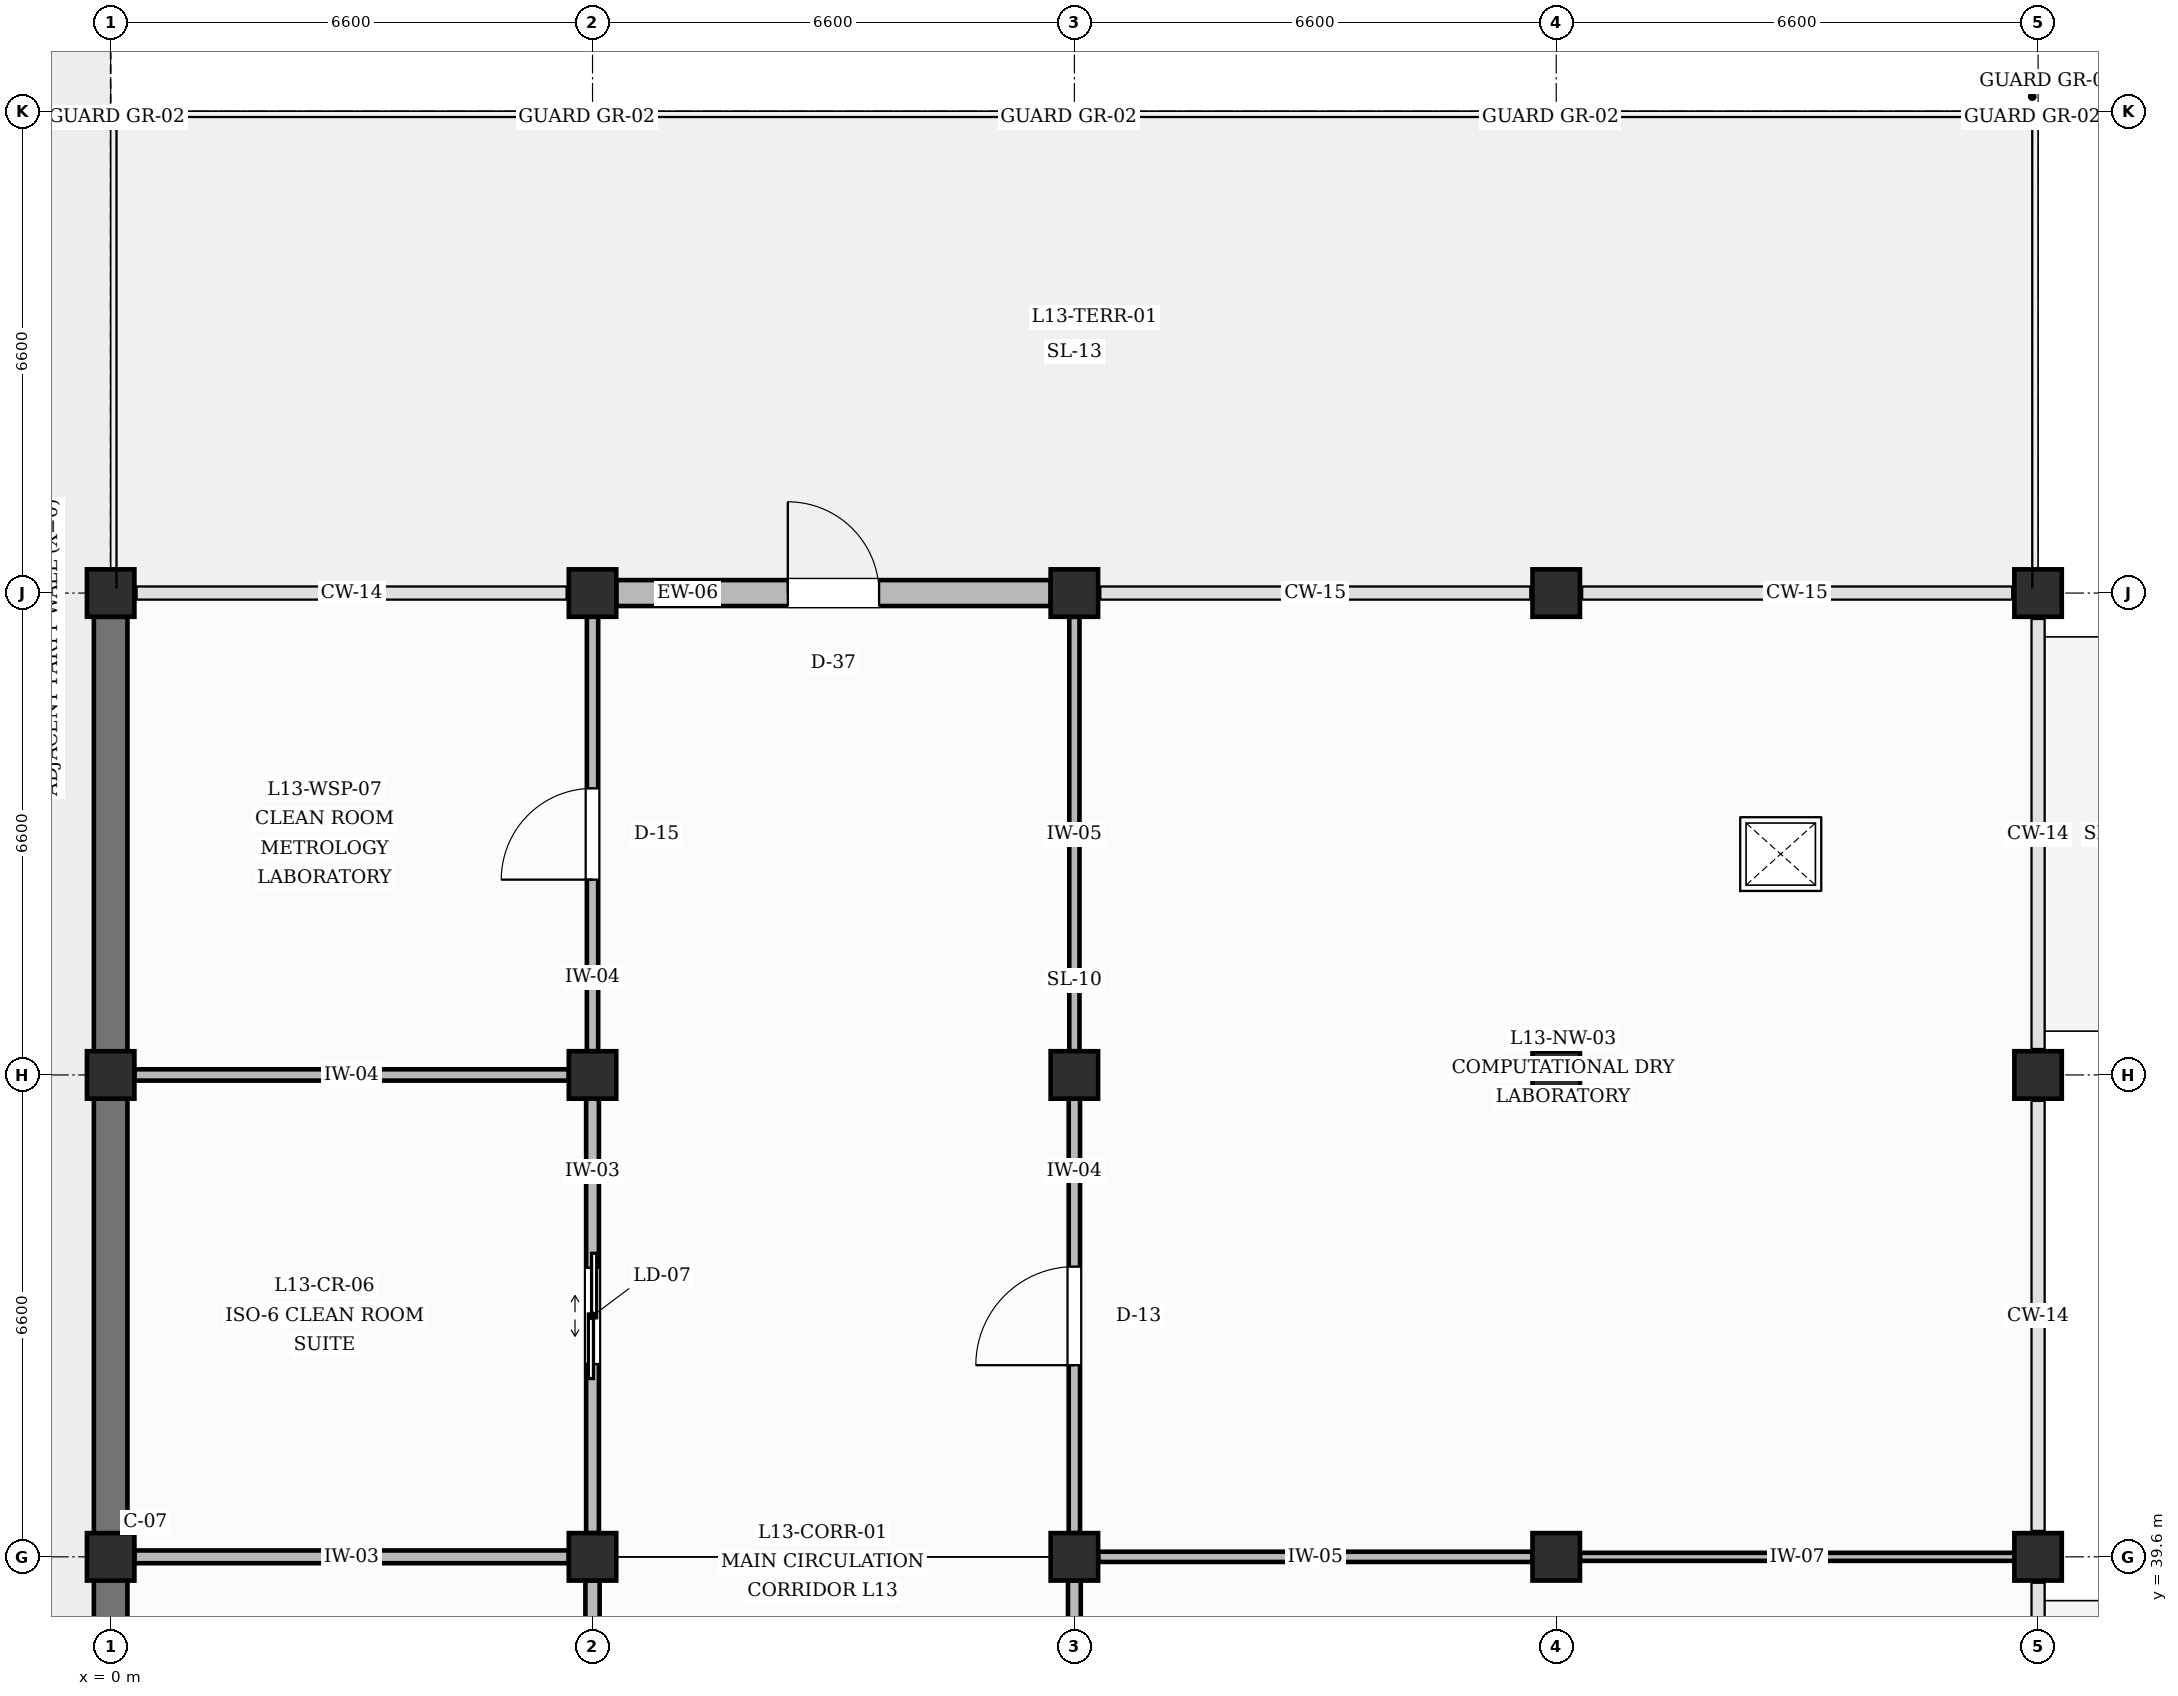
"""IFC4 building model, lengths in metres.
Left out: names, types, materials, properties, quantities, classifications, styles, units other than length and angle.
Written with IfcOpenShell. Run it as: python <this file> out.ifc"""

import sys

from ifc_helpers import new_model, si_unit, direction, frame, frame_2d, origin, origin_2d, place, context, subcontext, project, spatial, rectangle, extrude, element, fill, save


model = new_model("IFC4")
c1 = context("Model", 3, precision=1e-05, world=origin(), true_north=direction((0.0, 1.0)))
c2 = subcontext(c1, "Body", "Model", "MODEL_VIEW")
j1 = project(units=[si_unit("LENGTHUNIT", "METRE"), si_unit("PLANEANGLEUNIT", "RADIAN")], contexts=[c1])
p1 = place(None, origin())
s1 = spatial("IfcSite", under=j1, at=p1, CompositionType="ELEMENT")
p2 = place(p1, origin())
s2 = spatial("IfcBuilding", under=s1, at=p2, CompositionType="ELEMENT")
p3 = place(p2, frame((0.0, 0.0, 56.4)))
s3 = spatial("IfcBuildingStorey", under=s2, at=p3, CompositionType="ELEMENT", Elevation=56.4)
for number, where, z_axis, x_axis in (
    (1, (0.0, 39.6, 0.0), (0.0, 0.0, 1.0), (1.0, 0.0, 0.0)),
    (2, (0.0, 46.2, 0.0), (0.0, 0.0, 1.0), (1.0, 0.0, 0.0)),
    (3, (0.0, 52.8, 0.0), (0.0, 0.0, 1.0), (1.0, 0.0, 0.0)),
    (4, (6.6, 39.6, 0.0), (0.0, 0.0, 1.0), (1.0, 0.0, 0.0)),
    (5, (6.6, 46.2, 0.0), (0.0, 0.0, 1.0), (1.0, 0.0, 0.0)),
    (6, (6.6, 52.8, 0.0), (0.0, 0.0, 1.0), (1.0, 0.0, 0.0)),
    (7, (13.2, 39.6, 0.0), (0.0, 0.0, 1.0), (1.0, 0.0, 0.0)),
    (8, (13.2, 46.2, 0.0), (0.0, 0.0, 1.0), (1.0, 0.0, 0.0)),
    (9, (13.2, 52.8, 0.0), (0.0, 0.0, 1.0), (1.0, 0.0, 0.0)),
    (10, (19.8, 39.6, 0.0), (0.0, 0.0, 1.0), (1.0, 0.0, 0.0)),
    (11, (19.8, 46.2, 0.0), (0.0, 0.0, 1.0), (1.0, 0.0, 0.0)),
    (12, (19.8, 52.8, 0.0), (0.0, 0.0, 1.0), (1.0, 0.0, 0.0)),
    (13, (26.4, 39.6, 0.0), (0.0, 0.0, 1.0), (1.0, 0.0, 0.0)),
    (14, (26.4, 46.2, 0.0), (0.0, 0.0, 1.0), (1.0, 0.0, 0.0)),
    (15, (26.4, 52.8, 0.0), (0.0, 0.0, 1.0), (1.0, 0.0, 0.0)),
):
    element("IfcColumn", number, at=place(p3, frame(where, z_axis=z_axis, x_axis=x_axis)), inside=s3, PredefinedType="COLUMN", context=c2, shape_type="SweptSolid", body=[
        extrude(rectangle(XDim=0.65, YDim=0.65, at=origin_2d()), origin(), (0.0, 0.0, 1.0), 4.2),
    ])
for number, where, z_axis, x_axis in (
    (16, (0.0, 33.325, 0.0), (0.0, 0.0, 1.0), (0.0, 1.0, 0.0)),
    (17, (0.0, 39.925, 0.0), (0.0, 0.0, 1.0), (0.0, 1.0, 0.0)),
):
    element("IfcWall", number, at=place(p3, frame(where, z_axis=z_axis, x_axis=x_axis)), inside=s3, PredefinedType="SOLIDWALL", context=c2, shape_type="SweptSolid", body=[
        extrude(rectangle(XDim=5.95, YDim=0.46, at=frame_2d((2.975, 0.0))), origin(), (0.0, 0.0, 1.0), 3.3),
    ])
p4 = place(p3, frame((0.0, 46.525, 0.0), z_axis=(0.0, 0.0, 1.0), x_axis=(0.0, 1.0, 0.0)))
e18 = element("IfcWall", 18, at=p4, inside=s3, PredefinedType="SOLIDWALL", context=c2, shape_type="SweptSolid", body=[
    extrude(rectangle(XDim=5.95, YDim=0.46, at=frame_2d((2.975, 0.0))), origin(), (0.0, 0.0, 1.0), 3.3),
])
p5 = place(p3, frame((6.925, 52.8, 0.0), z_axis=(0.0, 0.0, 1.0), x_axis=(1.0, 0.0, 0.0)))
e19 = element("IfcWall", 19, at=p5, inside=s3, PredefinedType="SOLIDWALL", context=c2, shape_type="SweptSolid", body=[
    extrude(rectangle(XDim=5.95, YDim=0.355, at=frame_2d((2.975, 0.0))), origin(), (0.0, 0.0, 1.0), 3.3),
])
p6 = place(p5, frame((2.35, 0.0, 0.0)))
e20 = element("IfcOpeningElement", 20, at=p6, cuts=e19, PredefinedType="OPENING", context=c2, shape_type="SweptSolid", body=[
    extrude(rectangle(XDim=1.25, YDim=2.2, at=frame_2d((0.625, 1.1))), frame((0.0, 0.188, 0.0), z_axis=(0.0, -1.0, 0.0), x_axis=(1.0, 0.0, 0.0)), (0.0, 0.0, 1.0), 0.375),
])
p7 = place(p3, frame((6.6, 33.325, 0.0), z_axis=(0.0, 0.0, 1.0), x_axis=(0.0, 1.0, 0.0)))
e21 = element("IfcWall", 21, at=p7, inside=s3, PredefinedType="PARTITIONING", context=c2, shape_type="SweptSolid", body=[
    extrude(rectangle(XDim=5.95, YDim=0.195, at=frame_2d((2.975, 0.0))), origin(), (0.0, 0.0, 1.0), 3.3),
])
p8 = place(p7, frame((2.235, 0.0, 0.0)))
e22 = element("IfcOpeningElement", 22, at=p8, cuts=e21, PredefinedType="OPENING", context=c2, shape_type="SweptSolid", body=[
    extrude(rectangle(XDim=1.48, YDim=2.25, at=frame_2d((0.74, 1.125))), frame((0.0, 0.107, 0.0), z_axis=(0.0, -1.0, 0.0), x_axis=(1.0, 0.0, 0.0)), (0.0, 0.0, 1.0), 0.215),
])
p9 = place(p3, frame((0.325, 39.6, 0.0), z_axis=(0.0, 0.0, 1.0), x_axis=(1.0, 0.0, 0.0)))
e23 = element("IfcWall", 23, at=p9, inside=s3, PredefinedType="PARTITIONING", context=c2, shape_type="SweptSolid", body=[
    extrude(rectangle(XDim=5.95, YDim=0.175, at=frame_2d((2.975, 0.0))), origin(), (0.0, 0.0, 1.0), 3.3),
])
p10 = place(p3, frame((6.6, 39.925, 0.0), z_axis=(0.0, 0.0, 1.0), x_axis=(0.0, 1.0, 0.0)))
e24 = element("IfcWall", 24, at=p10, inside=s3, PredefinedType="PARTITIONING", context=c2, shape_type="SweptSolid", body=[
    extrude(rectangle(XDim=5.95, YDim=0.175, at=frame_2d((2.975, 0.0))), origin(), (0.0, 0.0, 1.0), 3.3),
])
p11 = place(p10, frame((2.315, 0.0, 0.0)))
e25 = element("IfcOpeningElement", 25, at=p11, cuts=e24, PredefinedType="OPENING", context=c2, shape_type="SweptSolid", body=[
    extrude(rectangle(XDim=1.32, YDim=2.2, at=frame_2d((0.66, 1.1))), frame((0.0, 0.097, 0.0), z_axis=(0.0, -1.0, 0.0), x_axis=(1.0, 0.0, 0.0)), (0.0, 0.0, 1.0), 0.195),
])
p12 = place(p3, frame((0.325, 46.2, 0.0), z_axis=(0.0, 0.0, 1.0), x_axis=(1.0, 0.0, 0.0)))
e26 = element("IfcWall", 26, at=p12, inside=s3, PredefinedType="PARTITIONING", context=c2, shape_type="SweptSolid", body=[
    extrude(rectangle(XDim=5.95, YDim=0.155, at=frame_2d((2.975, 0.0))), origin(), (0.0, 0.0, 1.0), 3.3),
])
p13 = place(p3, frame((6.6, 46.525, 0.0), z_axis=(0.0, 0.0, 1.0), x_axis=(0.0, 1.0, 0.0)))
e27 = element("IfcWall", 27, at=p13, inside=s3, PredefinedType="PARTITIONING", context=c2, shape_type="SweptSolid", body=[
    extrude(rectangle(XDim=5.95, YDim=0.155, at=frame_2d((2.975, 0.0))), origin(), (0.0, 0.0, 1.0), 3.3),
])
p14 = place(p13, frame((2.35, 0.0, 0.0)))
e28 = element("IfcOpeningElement", 28, at=p14, cuts=e27, PredefinedType="OPENING", context=c2, shape_type="SweptSolid", body=[
    extrude(rectangle(XDim=1.25, YDim=2.25, at=frame_2d((0.625, 1.125))), frame((0.0, 0.087, 0.0), z_axis=(0.0, -1.0, 0.0), x_axis=(1.0, 0.0, 0.0)), (0.0, 0.0, 1.0), 0.175),
])
p15 = place(p3, frame((13.2, 33.325, 0.0), z_axis=(0.0, 0.0, 1.0), x_axis=(0.0, 1.0, 0.0)))
e29 = element("IfcWall", 29, at=p15, inside=s3, PredefinedType="PARTITIONING", context=c2, shape_type="SweptSolid", body=[
    extrude(rectangle(XDim=5.95, YDim=0.175, at=frame_2d((2.975, 0.0))), origin(), (0.0, 0.0, 1.0), 3.3),
])
p16 = place(p3, frame((13.2, 39.925, 0.0), z_axis=(0.0, 0.0, 1.0), x_axis=(0.0, 1.0, 0.0)))
e30 = element("IfcWall", 30, at=p16, inside=s3, PredefinedType="PARTITIONING", context=c2, shape_type="SweptSolid", body=[
    extrude(rectangle(XDim=5.95, YDim=0.155, at=frame_2d((2.975, 0.0))), origin(), (0.0, 0.0, 1.0), 3.3),
])
p17 = place(p16, frame((2.3, 0.0, 0.0)))
e31 = element("IfcOpeningElement", 31, at=p17, cuts=e30, PredefinedType="OPENING", context=c2, shape_type="SweptSolid", body=[
    extrude(rectangle(XDim=1.35, YDim=2.3, at=frame_2d((0.675, 1.15))), frame((0.0, 0.087, 0.0), z_axis=(0.0, -1.0, 0.0), x_axis=(1.0, 0.0, 0.0)), (0.0, 0.0, 1.0), 0.175),
])
for number, where, z_axis, x_axis in (
    (32, (13.2, 46.525, 0.0), (0.0, 0.0, 1.0), (0.0, 1.0, 0.0)),
    (33, (13.525, 39.6, 0.0), (0.0, 0.0, 1.0), (1.0, 0.0, 0.0)),
):
    element("IfcWall", number, at=place(p3, frame(where, z_axis=z_axis, x_axis=x_axis)), inside=s3, PredefinedType="PARTITIONING", context=c2, shape_type="SweptSolid", body=[
        extrude(rectangle(XDim=5.95, YDim=0.14, at=frame_2d((2.975, 0.0))), origin(), (0.0, 0.0, 1.0), 3.3),
    ])
p18 = place(p3, frame((20.125, 39.6, 0.0), z_axis=(0.0, 0.0, 1.0), x_axis=(1.0, 0.0, 0.0)))
e34 = element("IfcWall", 34, at=p18, inside=s3, PredefinedType="PARTITIONING", context=c2, shape_type="SweptSolid", body=[
    extrude(rectangle(XDim=5.95, YDim=0.11, at=frame_2d((2.975, 0.0))), origin(), (0.0, 0.0, 1.0), 3.3),
])
p19 = place(p6, origin())
e35 = element("IfcDoor", 35, at=p19, inside=s3, OperationType="SINGLE_SWING_LEFT", PredefinedType="DOOR", context=c2, shape_type="SweptSolid", body=[
    extrude(rectangle(XDim=1.25, YDim=2.2, at=frame_2d((0.625, 1.1))), frame((0.0, 0.025, 0.0), z_axis=(0.0, -1.0, 0.0), x_axis=(1.0, 0.0, 0.0)), (0.0, 0.0, 1.0), 0.05),
])
fill(e20, e35)
p20 = place(p11, origin())
e36 = element("IfcDoor", 36, at=p20, inside=s3, OperationType="DOUBLE_DOOR_SLIDING", PredefinedType="USERDEFINED", context=c2, shape_type="SweptSolid", body=[
    extrude(rectangle(XDim=1.32, YDim=2.2, at=frame_2d((0.66, 1.1))), frame((0.0, 0.025, 0.0), z_axis=(0.0, -1.0, 0.0), x_axis=(1.0, 0.0, 0.0)), (0.0, 0.0, 1.0), 0.05),
])
fill(e25, e36)
p21 = place(p14, origin())
e37 = element("IfcDoor", 37, at=p21, inside=s3, OperationType="SINGLE_SWING_LEFT", PredefinedType="DOOR", context=c2, shape_type="SweptSolid", body=[
    extrude(rectangle(XDim=1.25, YDim=2.25, at=frame_2d((0.625, 1.125))), frame((0.0, 0.025, 0.0), z_axis=(0.0, -1.0, 0.0), x_axis=(1.0, 0.0, 0.0)), (0.0, 0.0, 1.0), 0.05),
])
fill(e28, e37)
p22 = place(p17, origin())
e38 = element("IfcDoor", 38, at=p22, inside=s3, OperationType="SINGLE_SWING_LEFT", PredefinedType="DOOR", context=c2, shape_type="SweptSolid", body=[
    extrude(rectangle(XDim=1.35, YDim=2.3, at=frame_2d((0.675, 1.15))), frame((0.0, 0.025, 0.0), z_axis=(0.0, -1.0, 0.0), x_axis=(1.0, 0.0, 0.0)), (0.0, 0.0, 1.0), 0.05),
])
fill(e31, e38)
save(model, sys.argv[1])
